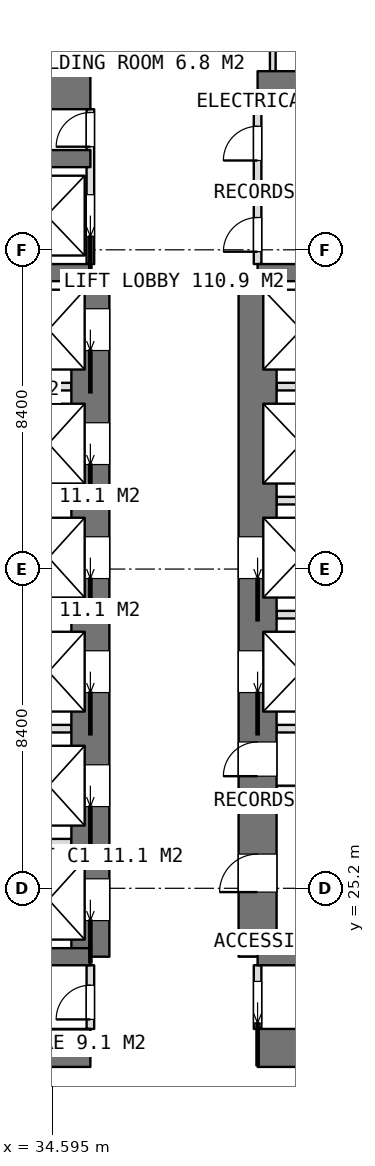
"""IFC4 building model, lengths in metres.
Left out: names, types, materials, properties, quantities, classifications, styles, units other than length and angle.
Written with IfcOpenShell. Run it as: python <this file> out.ifc"""

import sys

from ifc_helpers import new_model, si_unit, direction, frame, frame_2d, origin, place, context, subcontext, project, spatial, rectangle, extrude, element, fill, save


model = new_model("IFC4")
c1 = context("Model", 3, precision=1e-05, world=origin(), true_north=direction((0.0, 1.0)))
c2 = subcontext(c1, "Body", "Model", "MODEL_VIEW")
j1 = project(units=[si_unit("LENGTHUNIT", "METRE"), si_unit("PLANEANGLEUNIT", "RADIAN")], contexts=[c1])
p1 = place(None, origin())
s1 = spatial("IfcSite", under=j1, at=p1, CompositionType="ELEMENT")
p2 = place(p1, origin())
s2 = spatial("IfcBuilding", under=s1, at=p2, CompositionType="ELEMENT")
p3 = place(p2, frame((0.0, 0.0, 168.2)))
s3 = spatial("IfcBuildingStorey", under=s2, at=p3, CompositionType="ELEMENT", Elevation=168.2)
p4 = place(p3, frame((25.2, 21.0, 0.0), z_axis=(0.0, 0.0, 1.0), x_axis=(1.0, 0.0, 0.0)))
e1 = element("IfcWall", 1, at=p4, inside=s3, PredefinedType="SHEAR", context=c2, shape_type="SweptSolid", body=[
    extrude(rectangle(XDim=10.4, YDim=1.0, at=frame_2d((5.2, 0.0))), origin(), (0.0, 0.0, 1.0), 4.5),
])
p5 = place(p3, frame((40.0, 21.0, 0.0), z_axis=(0.0, 0.0, 1.0), x_axis=(1.0, 0.0, 0.0)))
e2 = element("IfcWall", 2, at=p5, inside=s3, PredefinedType="SHEAR", context=c2, shape_type="SweptSolid", body=[
    extrude(rectangle(XDim=10.4, YDim=1.0, at=frame_2d((5.2, 0.0))), origin(), (0.0, 0.0, 1.0), 4.5),
])
p6 = place(p3, frame((25.2, 46.2, 0.0), z_axis=(0.0, 0.0, 1.0), x_axis=(1.0, 0.0, 0.0)))
e3 = element("IfcWall", 3, at=p6, inside=s3, PredefinedType="SHEAR", context=c2, shape_type="SweptSolid", body=[
    extrude(rectangle(XDim=10.4, YDim=1.0, at=frame_2d((5.2, 0.0))), origin(), (0.0, 0.0, 1.0), 4.5),
])
p7 = place(p3, frame((40.0, 46.2, 0.0), z_axis=(0.0, 0.0, 1.0), x_axis=(1.0, 0.0, 0.0)))
e4 = element("IfcWall", 4, at=p7, inside=s3, PredefinedType="SHEAR", context=c2, shape_type="SweptSolid", body=[
    extrude(rectangle(XDim=10.4, YDim=1.0, at=frame_2d((5.2, 0.0))), origin(), (0.0, 0.0, 1.0), 4.5),
])
p8 = place(p3, frame((35.6, 23.4, 0.0), z_axis=(0.0, 0.0, 1.0), x_axis=(0.0, 1.0, 0.0)))
e5 = element("IfcWall", 5, at=p8, inside=s3, PredefinedType="SHEAR", context=c2, shape_type="SweptSolid", body=[
    extrude(rectangle(XDim=18.0, YDim=1.0, at=frame_2d((9.0, 0.0))), origin(), (0.0, 0.0, 1.0), 4.5),
])
p9 = place(p8, frame((0.95, 0.0, 0.0)))
e6 = element("IfcOpeningElement", 6, at=p9, cuts=e5, PredefinedType="OPENING", context=c2, shape_type="SweptSolid", body=[
    extrude(rectangle(XDim=1.1, YDim=2.1, at=frame_2d((0.55, 1.05))), frame((0.0, 0.51, 0.0), z_axis=(0.0, -1.0, 0.0), x_axis=(1.0, 0.0, 0.0)), (0.0, 0.0, 1.0), 1.02),
])
p10 = place(p8, frame((3.95, 0.0, 0.0)))
e7 = element("IfcOpeningElement", 7, at=p10, cuts=e5, PredefinedType="OPENING", context=c2, shape_type="SweptSolid", body=[
    extrude(rectangle(XDim=1.1, YDim=2.1, at=frame_2d((0.55, 1.05))), frame((0.0, 0.51, 0.0), z_axis=(0.0, -1.0, 0.0), x_axis=(1.0, 0.0, 0.0)), (0.0, 0.0, 1.0), 1.02),
])
p11 = place(p8, frame((6.95, 0.0, 0.0)))
e8 = element("IfcOpeningElement", 8, at=p11, cuts=e5, PredefinedType="OPENING", context=c2, shape_type="SweptSolid", body=[
    extrude(rectangle(XDim=1.1, YDim=2.1, at=frame_2d((0.55, 1.05))), frame((0.0, 0.51, 0.0), z_axis=(0.0, -1.0, 0.0), x_axis=(1.0, 0.0, 0.0)), (0.0, 0.0, 1.0), 1.02),
])
p12 = place(p8, frame((9.95, 0.0, 0.0)))
e9 = element("IfcOpeningElement", 9, at=p12, cuts=e5, PredefinedType="OPENING", context=c2, shape_type="SweptSolid", body=[
    extrude(rectangle(XDim=1.1, YDim=2.1, at=frame_2d((0.55, 1.05))), frame((0.0, 0.51, 0.0), z_axis=(0.0, -1.0, 0.0), x_axis=(1.0, 0.0, 0.0)), (0.0, 0.0, 1.0), 1.02),
])
p13 = place(p8, frame((12.95, 0.0, 0.0)))
e10 = element("IfcOpeningElement", 10, at=p13, cuts=e5, PredefinedType="OPENING", context=c2, shape_type="SweptSolid", body=[
    extrude(rectangle(XDim=1.1, YDim=2.1, at=frame_2d((0.55, 1.05))), frame((0.0, 0.51, 0.0), z_axis=(0.0, -1.0, 0.0), x_axis=(1.0, 0.0, 0.0)), (0.0, 0.0, 1.0), 1.02),
])
p14 = place(p8, frame((15.95, 0.0, 0.0)))
e11 = element("IfcOpeningElement", 11, at=p14, cuts=e5, PredefinedType="OPENING", context=c2, shape_type="SweptSolid", body=[
    extrude(rectangle(XDim=1.1, YDim=2.1, at=frame_2d((0.55, 1.05))), frame((0.0, 0.51, 0.0), z_axis=(0.0, -1.0, 0.0), x_axis=(1.0, 0.0, 0.0)), (0.0, 0.0, 1.0), 1.02),
])
p15 = place(p3, frame((40.0, 23.4, 0.0), z_axis=(0.0, 0.0, 1.0), x_axis=(0.0, 1.0, 0.0)))
e12 = element("IfcWall", 12, at=p15, inside=s3, PredefinedType="SHEAR", context=c2, shape_type="SweptSolid", body=[
    extrude(rectangle(XDim=18.0, YDim=1.0, at=frame_2d((9.0, 0.0))), origin(), (0.0, 0.0, 1.0), 4.5),
])
p16 = place(p15, frame((1.7, 0.0, 0.0)))
e13 = element("IfcOpeningElement", 13, at=p16, cuts=e12, PredefinedType="OPENING", context=c2, shape_type="SweptSolid", body=[
    extrude(rectangle(XDim=1.0, YDim=2.1, at=frame_2d((0.5, 1.05))), frame((0.0, 0.51, 0.0), z_axis=(0.0, -1.0, 0.0), x_axis=(1.0, 0.0, 0.0)), (0.0, 0.0, 1.0), 1.02),
])
p17 = place(p15, frame((4.75, 0.0, 0.0)))
e14 = element("IfcOpeningElement", 14, at=p17, cuts=e12, PredefinedType="OPENING", context=c2, shape_type="SweptSolid", body=[
    extrude(rectangle(XDim=0.9, YDim=2.1, at=frame_2d((0.45, 1.05))), frame((0.0, 0.51, 0.0), z_axis=(0.0, -1.0, 0.0), x_axis=(1.0, 0.0, 0.0)), (0.0, 0.0, 1.0), 1.02),
])
p18 = place(p15, frame((6.95, 0.0, 0.0)))
e15 = element("IfcOpeningElement", 15, at=p18, cuts=e12, PredefinedType="OPENING", context=c2, shape_type="SweptSolid", body=[
    extrude(rectangle(XDim=1.1, YDim=2.1, at=frame_2d((0.55, 1.05))), frame((0.0, 0.51, 0.0), z_axis=(0.0, -1.0, 0.0), x_axis=(1.0, 0.0, 0.0)), (0.0, 0.0, 1.0), 1.02),
])
p19 = place(p15, frame((9.95, 0.0, 0.0)))
e16 = element("IfcOpeningElement", 16, at=p19, cuts=e12, PredefinedType="OPENING", context=c2, shape_type="SweptSolid", body=[
    extrude(rectangle(XDim=1.1, YDim=2.1, at=frame_2d((0.55, 1.05))), frame((0.0, 0.51, 0.0), z_axis=(0.0, -1.0, 0.0), x_axis=(1.0, 0.0, 0.0)), (0.0, 0.0, 1.0), 1.02),
])
for number, where, z_axis, x_axis in (
    (17, (31.8, 23.4, 0.0), (0.0, 0.0, 1.0), (1.0, 0.0, 0.0)),
    (18, (31.8, 41.4, 0.0), (0.0, 0.0, 1.0), (1.0, 0.0, 0.0)),
    (19, (31.8, 44.4, 0.0), (0.0, 0.0, 1.0), (1.0, 0.0, 0.0)),
    (20, (40.0, 23.4, 0.0), (0.0, 0.0, 1.0), (1.0, 0.0, 0.0)),
    (21, (40.0, 41.4, 0.0), (0.0, 0.0, 1.0), (1.0, 0.0, 0.0)),
):
    element("IfcWall", number, at=place(p3, frame(where, z_axis=z_axis, x_axis=x_axis)), inside=s3, PredefinedType="SHEAR", context=c2, shape_type="SweptSolid", body=[
        extrude(rectangle(XDim=3.8, YDim=0.45, at=frame_2d((1.9, 0.0))), origin(), (0.0, 0.0, 1.0), 4.5),
    ])
for number, where, z_axis, x_axis in (
    (22, (32.025, 26.4, 0.0), (0.0, 0.0, 1.0), (1.0, 0.0, 0.0)),
    (23, (32.025, 29.4, 0.0), (0.0, 0.0, 1.0), (1.0, 0.0, 0.0)),
    (24, (32.025, 32.4, 0.0), (0.0, 0.0, 1.0), (1.0, 0.0, 0.0)),
    (25, (32.025, 35.4, 0.0), (0.0, 0.0, 1.0), (1.0, 0.0, 0.0)),
    (26, (32.025, 38.4, 0.0), (0.0, 0.0, 1.0), (1.0, 0.0, 0.0)),
):
    element("IfcWall", number, at=place(p3, frame(where, z_axis=z_axis, x_axis=x_axis)), inside=s3, PredefinedType="PARTITIONING", context=c2, shape_type="SweptSolid", body=[
        extrude(rectangle(XDim=3.075, YDim=0.2, at=frame_2d((1.538, 0.0))), origin(), (0.0, 0.0, 1.0), 4.25),
    ])
for number, where, z_axis, x_axis in (
    (27, (40.5, 29.4, 0.0), (0.0, 0.0, 1.0), (1.0, 0.0, 0.0)),
    (28, (40.5, 32.4, 0.0), (0.0, 0.0, 1.0), (1.0, 0.0, 0.0)),
    (29, (40.5, 35.4, 0.0), (0.0, 0.0, 1.0), (1.0, 0.0, 0.0)),
    (30, (40.5, 38.4, 0.0), (0.0, 0.0, 1.0), (1.0, 0.0, 0.0)),
):
    element("IfcWall", number, at=place(p3, frame(where, z_axis=z_axis, x_axis=x_axis)), inside=s3, PredefinedType="PARTITIONING", context=c2, shape_type="SweptSolid", body=[
        extrude(rectangle(XDim=3.075, YDim=0.2, at=frame_2d((1.538, 0.0))), origin(), (0.0, 0.0, 1.0), 4.25),
    ])
p20 = place(p3, frame((40.0, 21.5, 0.0), z_axis=(0.0, 0.0, 1.0), x_axis=(0.0, 1.0, 0.0)))
e31 = element("IfcWall", 31, at=p20, inside=s3, PredefinedType="PARTITIONING", context=c2, shape_type="SweptSolid", body=[
    extrude(rectangle(XDim=1.675, YDim=0.2, at=frame_2d((0.837, 0.0))), origin(), (0.0, 0.0, 1.0), 4.25),
])
p21 = place(p20, frame((0.15, 0.0, 0.0)))
e32 = element("IfcOpeningElement", 32, at=p21, cuts=e31, PredefinedType="OPENING", context=c2, shape_type="SweptSolid", body=[
    extrude(rectangle(XDim=1.1, YDim=2.1, at=frame_2d((0.55, 1.05))), frame((0.0, 0.11, 0.0), z_axis=(0.0, -1.0, 0.0), x_axis=(1.0, 0.0, 0.0)), (0.0, 0.0, 1.0), 0.22),
])
p22 = place(p3, frame((40.0, 41.625, 0.0), z_axis=(0.0, 0.0, 1.0), x_axis=(0.0, 1.0, 0.0)))
e33 = element("IfcWall", 33, at=p22, inside=s3, PredefinedType="PARTITIONING", context=c2, shape_type="SweptSolid", body=[
    extrude(rectangle(XDim=4.075, YDim=0.2, at=frame_2d((2.038, 0.0))), origin(), (0.0, 0.0, 1.0), 4.25),
])
p23 = place(p22, frame((2.725, 0.0, 0.0)))
e34 = element("IfcOpeningElement", 34, at=p23, cuts=e33, PredefinedType="OPENING", context=c2, shape_type="SweptSolid", body=[
    extrude(rectangle(XDim=0.9, YDim=2.1, at=frame_2d((0.45, 1.05))), frame((0.0, 0.11, 0.0), z_axis=(0.0, -1.0, 0.0), x_axis=(1.0, 0.0, 0.0)), (0.0, 0.0, 1.0), 0.22),
])
p24 = place(p22, frame((0.325, 0.0, 0.0)))
e35 = element("IfcOpeningElement", 35, at=p24, cuts=e33, PredefinedType="OPENING", context=c2, shape_type="SweptSolid", body=[
    extrude(rectangle(XDim=0.9, YDim=2.1, at=frame_2d((0.45, 1.05))), frame((0.0, 0.11, 0.0), z_axis=(0.0, -1.0, 0.0), x_axis=(1.0, 0.0, 0.0)), (0.0, 0.0, 1.0), 0.22),
])
p25 = place(p3, frame((35.6, 41.625, 0.0), z_axis=(0.0, 0.0, 1.0), x_axis=(0.0, 1.0, 0.0)))
e36 = element("IfcWall", 36, at=p25, inside=s3, PredefinedType="PARTITIONING", context=c2, shape_type="SweptSolid", body=[
    extrude(rectangle(XDim=4.075, YDim=0.2, at=frame_2d((2.038, 0.0))), origin(), (0.0, 0.0, 1.0), 4.25),
])
p26 = place(p25, frame((3.088, 0.0, 0.0)))
e37 = element("IfcOpeningElement", 37, at=p26, cuts=e36, PredefinedType="OPENING", context=c2, shape_type="SweptSolid", body=[
    extrude(rectangle(XDim=0.9, YDim=2.1, at=frame_2d((0.45, 1.05))), frame((0.0, 0.11, 0.0), z_axis=(0.0, -1.0, 0.0), x_axis=(1.0, 0.0, 0.0)), (0.0, 0.0, 1.0), 0.22),
])
p27 = place(p25, frame((0.725, 0.0, 0.0)))
e38 = element("IfcOpeningElement", 38, at=p27, cuts=e36, PredefinedType="OPENING", context=c2, shape_type="SweptSolid", body=[
    extrude(rectangle(XDim=1.1, YDim=2.1, at=frame_2d((0.55, 1.05))), frame((0.0, 0.11, 0.0), z_axis=(0.0, -1.0, 0.0), x_axis=(1.0, 0.0, 0.0)), (0.0, 0.0, 1.0), 0.22),
])
p28 = place(p3, frame((35.6, 21.5, 0.0), z_axis=(0.0, 0.0, 1.0), x_axis=(0.0, 1.0, 0.0)))
e39 = element("IfcWall", 39, at=p28, inside=s3, PredefinedType="PARTITIONING", context=c2, shape_type="SweptSolid", body=[
    extrude(rectangle(XDim=1.675, YDim=0.2, at=frame_2d((0.837, 0.0))), origin(), (0.0, 0.0, 1.0), 4.25),
])
p29 = place(p28, frame((0.25, 0.0, 0.0)))
e40 = element("IfcOpeningElement", 40, at=p29, cuts=e39, PredefinedType="OPENING", context=c2, shape_type="SweptSolid", body=[
    extrude(rectangle(XDim=0.9, YDim=2.1, at=frame_2d((0.45, 1.05))), frame((0.0, 0.11, 0.0), z_axis=(0.0, -1.0, 0.0), x_axis=(1.0, 0.0, 0.0)), (0.0, 0.0, 1.0), 0.22),
])
p30 = place(p3, frame((40.5, 27.8, 0.0), z_axis=(0.0, 0.0, 1.0), x_axis=(1.0, 0.0, 0.0)))
e41 = element("IfcWall", 41, at=p30, inside=s3, PredefinedType="PARTITIONING", context=c2, shape_type="SweptSolid", body=[
    extrude(rectangle(XDim=3.075, YDim=0.2, at=frame_2d((1.538, 0.0))), origin(), (0.0, 0.0, 1.0), 4.25),
])
p31 = place(p3, frame((40.0, 43.4, 0.0), z_axis=(0.0, 0.0, 1.0), x_axis=(1.0, 0.0, 0.0)))
e42 = element("IfcWall", 42, at=p31, inside=s3, PredefinedType="PARTITIONING", context=c2, shape_type="SweptSolid", body=[
    extrude(rectangle(XDim=3.575, YDim=0.2, at=frame_2d((1.788, 0.0))), origin(), (0.0, 0.0, 1.0), 4.25),
])
for number, where, z_axis, x_axis in (
    (43, (40.4, 46.7, 0.0), (0.0, 0.0, 1.0), (0.0, 1.0, 0.0)),
    (44, (35.2, 46.7, 0.0), (0.0, 0.0, 1.0), (0.0, 1.0, 0.0)),
):
    element("IfcWall", number, at=place(p3, frame(where, z_axis=z_axis, x_axis=x_axis)), inside=s3, PredefinedType="PARTITIONING", context=c2, shape_type="SweptSolid", body=[
        extrude(rectangle(XDim=2.625, YDim=0.15, at=frame_2d((1.312, 0.0))), origin(), (0.0, 0.0, 1.0), 4.25),
    ])
p32 = place(p21, origin())
e45 = element("IfcDoor", 45, at=p32, inside=s3, OperationType="SLIDING_TO_LEFT", PredefinedType="DOOR", context=c2, shape_type="SweptSolid", body=[
    extrude(rectangle(XDim=1.1, YDim=2.1, at=frame_2d((0.55, 1.05))), frame((0.0, 0.025, 0.0), z_axis=(0.0, -1.0, 0.0), x_axis=(1.0, 0.0, 0.0)), (0.0, 0.0, 1.0), 0.05),
])
fill(e32, e45)
p33 = place(p29, origin())
e46 = element("IfcDoor", 46, at=p33, inside=s3, OperationType="SINGLE_SWING_LEFT", PredefinedType="DOOR", context=c2, shape_type="SweptSolid", body=[
    extrude(rectangle(XDim=0.9, YDim=2.1, at=frame_2d((0.45, 1.05))), frame((0.0, 0.025, 0.0), z_axis=(0.0, -1.0, 0.0), x_axis=(1.0, 0.0, 0.0)), (0.0, 0.0, 1.0), 0.05),
])
fill(e40, e46)
p34 = place(p23, origin())
e47 = element("IfcDoor", 47, at=p34, inside=s3, OperationType="SINGLE_SWING_LEFT", PredefinedType="DOOR", context=c2, shape_type="SweptSolid", body=[
    extrude(rectangle(XDim=0.9, YDim=2.1, at=frame_2d((0.45, 1.05))), frame((0.0, 0.025, 0.0), z_axis=(0.0, -1.0, 0.0), x_axis=(1.0, 0.0, 0.0)), (0.0, 0.0, 1.0), 0.05),
])
fill(e34, e47)
p35 = place(p24, origin())
e48 = element("IfcDoor", 48, at=p35, inside=s3, OperationType="SINGLE_SWING_LEFT", PredefinedType="DOOR", context=c2, shape_type="SweptSolid", body=[
    extrude(rectangle(XDim=0.9, YDim=2.1, at=frame_2d((0.45, 1.05))), frame((0.0, 0.025, 0.0), z_axis=(0.0, -1.0, 0.0), x_axis=(1.0, 0.0, 0.0)), (0.0, 0.0, 1.0), 0.05),
])
fill(e35, e48)
p36 = place(p16, origin())
e49 = element("IfcDoor", 49, at=p36, inside=s3, OperationType="SINGLE_SWING_LEFT", PredefinedType="DOOR", context=c2, shape_type="SweptSolid", body=[
    extrude(rectangle(XDim=1.0, YDim=2.1, at=frame_2d((0.5, 1.05))), frame((0.0, 0.025, 0.0), z_axis=(0.0, -1.0, 0.0), x_axis=(1.0, 0.0, 0.0)), (0.0, 0.0, 1.0), 0.05),
])
fill(e13, e49)
p37 = place(p17, origin())
e50 = element("IfcDoor", 50, at=p37, inside=s3, OperationType="SINGLE_SWING_LEFT", PredefinedType="DOOR", context=c2, shape_type="SweptSolid", body=[
    extrude(rectangle(XDim=0.9, YDim=2.1, at=frame_2d((0.45, 1.05))), frame((0.0, 0.025, 0.0), z_axis=(0.0, -1.0, 0.0), x_axis=(1.0, 0.0, 0.0)), (0.0, 0.0, 1.0), 0.05),
])
fill(e14, e50)
p38 = place(p26, origin())
e51 = element("IfcDoor", 51, at=p38, inside=s3, OperationType="SINGLE_SWING_LEFT", PredefinedType="DOOR", context=c2, shape_type="SweptSolid", body=[
    extrude(rectangle(XDim=0.9, YDim=2.1, at=frame_2d((0.45, 1.05))), frame((0.0, 0.025, 0.0), z_axis=(0.0, -1.0, 0.0), x_axis=(1.0, 0.0, 0.0)), (0.0, 0.0, 1.0), 0.05),
])
fill(e37, e51)
p39 = place(p9, origin())
e52 = element("IfcDoor", 52, at=p39, inside=s3, OperationType="SLIDING_TO_LEFT", PredefinedType="USERDEFINED", context=c2, shape_type="SweptSolid", body=[
    extrude(rectangle(XDim=1.1, YDim=2.1, at=frame_2d((0.55, 1.05))), frame((0.0, 0.025, 0.0), z_axis=(0.0, -1.0, 0.0), x_axis=(1.0, 0.0, 0.0)), (0.0, 0.0, 1.0), 0.05),
])
fill(e6, e52)
p40 = place(p10, origin())
e53 = element("IfcDoor", 53, at=p40, inside=s3, OperationType="SLIDING_TO_LEFT", PredefinedType="USERDEFINED", context=c2, shape_type="SweptSolid", body=[
    extrude(rectangle(XDim=1.1, YDim=2.1, at=frame_2d((0.55, 1.05))), frame((0.0, 0.025, 0.0), z_axis=(0.0, -1.0, 0.0), x_axis=(1.0, 0.0, 0.0)), (0.0, 0.0, 1.0), 0.05),
])
fill(e7, e53)
p41 = place(p11, origin())
e54 = element("IfcDoor", 54, at=p41, inside=s3, OperationType="SLIDING_TO_LEFT", PredefinedType="USERDEFINED", context=c2, shape_type="SweptSolid", body=[
    extrude(rectangle(XDim=1.1, YDim=2.1, at=frame_2d((0.55, 1.05))), frame((0.0, 0.025, 0.0), z_axis=(0.0, -1.0, 0.0), x_axis=(1.0, 0.0, 0.0)), (0.0, 0.0, 1.0), 0.05),
])
fill(e8, e54)
p42 = place(p12, origin())
e55 = element("IfcDoor", 55, at=p42, inside=s3, OperationType="SLIDING_TO_LEFT", PredefinedType="USERDEFINED", context=c2, shape_type="SweptSolid", body=[
    extrude(rectangle(XDim=1.1, YDim=2.1, at=frame_2d((0.55, 1.05))), frame((0.0, 0.025, 0.0), z_axis=(0.0, -1.0, 0.0), x_axis=(1.0, 0.0, 0.0)), (0.0, 0.0, 1.0), 0.05),
])
fill(e9, e55)
p43 = place(p13, origin())
e56 = element("IfcDoor", 56, at=p43, inside=s3, OperationType="SLIDING_TO_LEFT", PredefinedType="USERDEFINED", context=c2, shape_type="SweptSolid", body=[
    extrude(rectangle(XDim=1.1, YDim=2.1, at=frame_2d((0.55, 1.05))), frame((0.0, 0.025, 0.0), z_axis=(0.0, -1.0, 0.0), x_axis=(1.0, 0.0, 0.0)), (0.0, 0.0, 1.0), 0.05),
])
fill(e10, e56)
p44 = place(p14, origin())
e57 = element("IfcDoor", 57, at=p44, inside=s3, OperationType="SLIDING_TO_LEFT", PredefinedType="USERDEFINED", context=c2, shape_type="SweptSolid", body=[
    extrude(rectangle(XDim=1.1, YDim=2.1, at=frame_2d((0.55, 1.05))), frame((0.0, 0.025, 0.0), z_axis=(0.0, -1.0, 0.0), x_axis=(1.0, 0.0, 0.0)), (0.0, 0.0, 1.0), 0.05),
])
fill(e11, e57)
p45 = place(p18, origin())
e58 = element("IfcDoor", 58, at=p45, inside=s3, OperationType="SLIDING_TO_LEFT", PredefinedType="USERDEFINED", context=c2, shape_type="SweptSolid", body=[
    extrude(rectangle(XDim=1.1, YDim=2.1, at=frame_2d((0.55, 1.05))), frame((0.0, 0.025, 0.0), z_axis=(0.0, -1.0, 0.0), x_axis=(1.0, 0.0, 0.0)), (0.0, 0.0, 1.0), 0.05),
])
fill(e15, e58)
p46 = place(p19, origin())
e59 = element("IfcDoor", 59, at=p46, inside=s3, OperationType="SLIDING_TO_LEFT", PredefinedType="USERDEFINED", context=c2, shape_type="SweptSolid", body=[
    extrude(rectangle(XDim=1.1, YDim=2.1, at=frame_2d((0.55, 1.05))), frame((0.0, 0.025, 0.0), z_axis=(0.0, -1.0, 0.0), x_axis=(1.0, 0.0, 0.0)), (0.0, 0.0, 1.0), 0.05),
])
fill(e16, e59)
p47 = place(p27, origin())
e60 = element("IfcDoor", 60, at=p47, inside=s3, OperationType="SLIDING_TO_LEFT", PredefinedType="USERDEFINED", context=c2, shape_type="SweptSolid", body=[
    extrude(rectangle(XDim=1.1, YDim=2.1, at=frame_2d((0.55, 1.05))), frame((0.0, 0.025, 0.0), z_axis=(0.0, -1.0, 0.0), x_axis=(1.0, 0.0, 0.0)), (0.0, 0.0, 1.0), 0.05),
])
fill(e38, e60)
save(model, sys.argv[1])
